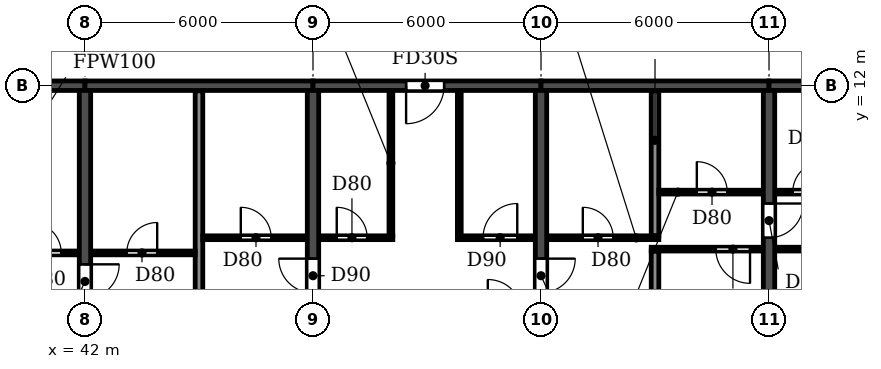
"""IFC4 building model, lengths in metres.
Left out: names, types, materials, properties, quantities, classifications, styles, units other than length and angle.
Written with IfcOpenShell. Run it as: python <this file> out.ifc"""

import sys

from ifc_helpers import new_model, si_unit, direction, frame, frame_2d, origin, place, context, subcontext, project, spatial, rectangle, extrude, element, fill, save


model = new_model("IFC4")
c1 = context("Model", 3, precision=1e-05, world=origin(), true_north=direction((0.0, 1.0)))
c2 = subcontext(c1, "Body", "Model", "MODEL_VIEW")
j1 = project(units=[si_unit("LENGTHUNIT", "METRE"), si_unit("PLANEANGLEUNIT", "RADIAN")], contexts=[c1])
p1 = place(None, origin())
s1 = spatial("IfcSite", under=j1, at=p1, CompositionType="ELEMENT")
p2 = place(p1, origin())
s2 = spatial("IfcBuilding", under=s1, at=p2, CompositionType="ELEMENT")
p3 = place(p2, frame((0.0, 0.0, 155.4)))
s3 = spatial("IfcBuildingStorey", under=s2, at=p3, CompositionType="ELEMENT", Elevation=155.4)
p4 = place(p3, frame((42.0, 0.2, 0.0), z_axis=(0.0, 0.0, 1.0), x_axis=(0.0, 1.0, 0.0)))
e1 = element("IfcWall", 1, at=p4, inside=s3, PredefinedType="SHEAR", context=c2, shape_type="SweptSolid", body=[
    extrude(rectangle(XDim=11.675, YDim=0.3, at=frame_2d((5.837, 0.0))), origin(), (0.0, 0.0, 1.0), 3.0),
])
p5 = place(p4, frame((6.2, 0.0, 0.0)))
e2 = element("IfcOpeningElement", 2, at=p5, cuts=e1, PredefinedType="OPENING", context=c2, shape_type="SweptSolid", body=[
    extrude(rectangle(XDim=0.9, YDim=2.1, at=frame_2d((0.45, 1.05))), frame((0.0, 0.16, 0.0), z_axis=(0.0, -1.0, 0.0), x_axis=(1.0, 0.0, 0.0)), (0.0, 0.0, 1.0), 0.32),
])
p6 = place(p3, frame((48.0, 0.2, 0.0), z_axis=(0.0, 0.0, 1.0), x_axis=(0.0, 1.0, 0.0)))
e3 = element("IfcWall", 3, at=p6, inside=s3, PredefinedType="SHEAR", context=c2, shape_type="SweptSolid", body=[
    extrude(rectangle(XDim=11.675, YDim=0.3, at=frame_2d((5.837, 0.0))), origin(), (0.0, 0.0, 1.0), 3.0),
])
p7 = place(p6, frame((6.35, 0.0, 0.0)))
e4 = element("IfcOpeningElement", 4, at=p7, cuts=e3, PredefinedType="OPENING", context=c2, shape_type="SweptSolid", body=[
    extrude(rectangle(XDim=0.9, YDim=2.1, at=frame_2d((0.45, 1.05))), frame((0.0, 0.16, 0.0), z_axis=(0.0, -1.0, 0.0), x_axis=(1.0, 0.0, 0.0)), (0.0, 0.0, 1.0), 0.32),
])
p8 = place(p3, frame((54.0, 0.2, 0.0), z_axis=(0.0, 0.0, 1.0), x_axis=(0.0, 1.0, 0.0)))
e5 = element("IfcWall", 5, at=p8, inside=s3, PredefinedType="SHEAR", context=c2, shape_type="SweptSolid", body=[
    extrude(rectangle(XDim=11.675, YDim=0.3, at=frame_2d((5.837, 0.0))), origin(), (0.0, 0.0, 1.0), 3.0),
])
p9 = place(p8, frame((6.35, 0.0, 0.0)))
e6 = element("IfcOpeningElement", 6, at=p9, cuts=e5, PredefinedType="OPENING", context=c2, shape_type="SweptSolid", body=[
    extrude(rectangle(XDim=0.9, YDim=2.1, at=frame_2d((0.45, 1.05))), frame((0.0, 0.16, 0.0), z_axis=(0.0, -1.0, 0.0), x_axis=(1.0, 0.0, 0.0)), (0.0, 0.0, 1.0), 0.32),
])
p10 = place(p3, frame((60.0, 0.2, 0.0), z_axis=(0.0, 0.0, 1.0), x_axis=(0.0, 1.0, 0.0)))
e7 = element("IfcWall", 7, at=p10, inside=s3, PredefinedType="SHEAR", context=c2, shape_type="SweptSolid", body=[
    extrude(rectangle(XDim=11.675, YDim=0.3, at=frame_2d((5.837, 0.0))), origin(), (0.0, 0.0, 1.0), 3.0),
])
p11 = place(p10, frame((7.8, 0.0, 0.0)))
e8 = element("IfcOpeningElement", 8, at=p11, cuts=e7, PredefinedType="OPENING", context=c2, shape_type="SweptSolid", body=[
    extrude(rectangle(XDim=0.9, YDim=2.1, at=frame_2d((0.45, 1.05))), frame((0.0, 0.16, 0.0), z_axis=(0.0, -1.0, 0.0), x_axis=(1.0, 0.0, 0.0)), (0.0, 0.0, 1.0), 0.32),
])
p12 = place(p3, frame((36.0, 12.0, 0.0), z_axis=(0.0, 0.0, 1.0), x_axis=(1.0, 0.0, 0.0)))
e9 = element("IfcWall", 9, at=p12, inside=s3, PredefinedType="SHEAR", context=c2, shape_type="SweptSolid", body=[
    extrude(rectangle(XDim=6.0, YDim=0.25, at=frame_2d((3.0, 0.0))), origin(), (0.0, 0.0, 1.0), 2.4),
])
p13 = place(p12, frame((2.55, 0.0, 0.0)))
e10 = element("IfcOpeningElement", 10, at=p13, cuts=e9, PredefinedType="OPENING", context=c2, shape_type="SweptSolid", body=[
    extrude(rectangle(XDim=1.0, YDim=2.1, at=frame_2d((0.5, 1.05))), frame((0.0, 0.135, 0.0), z_axis=(0.0, -1.0, 0.0), x_axis=(1.0, 0.0, 0.0)), (0.0, 0.0, 1.0), 0.27),
])
p14 = place(p3, frame((42.0, 12.0, 0.0), z_axis=(0.0, 0.0, 1.0), x_axis=(1.0, 0.0, 0.0)))
e11 = element("IfcWall", 11, at=p14, inside=s3, PredefinedType="SHEAR", context=c2, shape_type="SweptSolid", body=[
    extrude(rectangle(XDim=6.0, YDim=0.25, at=frame_2d((3.0, 0.0))), origin(), (0.0, 0.0, 1.0), 2.4),
])
p15 = place(p3, frame((48.0, 12.0, 0.0), z_axis=(0.0, 0.0, 1.0), x_axis=(1.0, 0.0, 0.0)))
e12 = element("IfcWall", 12, at=p15, inside=s3, PredefinedType="SHEAR", context=c2, shape_type="SweptSolid", body=[
    extrude(rectangle(XDim=6.0, YDim=0.25, at=frame_2d((3.0, 0.0))), origin(), (0.0, 0.0, 1.0), 2.4),
])
p16 = place(p15, frame((2.45, 0.0, 0.0)))
e13 = element("IfcOpeningElement", 13, at=p16, cuts=e12, PredefinedType="OPENING", context=c2, shape_type="SweptSolid", body=[
    extrude(rectangle(XDim=1.0, YDim=2.1, at=frame_2d((0.5, 1.05))), frame((0.0, 0.135, 0.0), z_axis=(0.0, -1.0, 0.0), x_axis=(1.0, 0.0, 0.0)), (0.0, 0.0, 1.0), 0.27),
])
p17 = place(p3, frame((54.0, 12.0, 0.0), z_axis=(0.0, 0.0, 1.0), x_axis=(1.0, 0.0, 0.0)))
e14 = element("IfcWall", 14, at=p17, inside=s3, PredefinedType="SHEAR", context=c2, shape_type="SweptSolid", body=[
    extrude(rectangle(XDim=6.0, YDim=0.25, at=frame_2d((3.0, 0.0))), origin(), (0.0, 0.0, 1.0), 2.4),
])
p18 = place(p3, frame((60.0, 12.0, 0.0), z_axis=(0.0, 0.0, 1.0), x_axis=(1.0, 0.0, 0.0)))
e15 = element("IfcWall", 15, at=p18, inside=s3, PredefinedType="SHEAR", context=c2, shape_type="SweptSolid", body=[
    extrude(rectangle(XDim=6.0, YDim=0.25, at=frame_2d((3.0, 0.0))), origin(), (0.0, 0.0, 1.0), 2.4),
])
p19 = place(p18, frame((2.45, 0.0, 0.0)))
e16 = element("IfcOpeningElement", 16, at=p19, cuts=e15, PredefinedType="OPENING", context=c2, shape_type="SweptSolid", body=[
    extrude(rectangle(XDim=1.0, YDim=2.1, at=frame_2d((0.5, 1.05))), frame((0.0, 0.135, 0.0), z_axis=(0.0, -1.0, 0.0), x_axis=(1.0, 0.0, 0.0)), (0.0, 0.0, 1.0), 0.27),
])
p20 = place(p3, frame((45.0, 0.06, 0.0), z_axis=(0.0, 0.0, 1.0), x_axis=(0.0, 1.0, 0.0)))
e17 = element("IfcWall", 17, at=p20, inside=s3, PredefinedType="PARTITIONING", context=c2, shape_type="SweptSolid", body=[
    extrude(rectangle(XDim=11.805, YDim=0.2, at=frame_2d((5.902, 0.0))), origin(), (0.0, 0.0, 1.0), 3.0),
])
p21 = place(p3, frame((57.0, 0.06, 0.0), z_axis=(0.0, 0.0, 1.0), x_axis=(0.0, 1.0, 0.0)))
e18 = element("IfcWall", 18, at=p21, inside=s3, PredefinedType="PARTITIONING", context=c2, shape_type="SweptSolid", body=[
    extrude(rectangle(XDim=7.59, YDim=0.2, at=frame_2d((3.795, 0.0))), origin(), (0.0, 0.0, 1.0), 3.0),
])
p22 = place(p3, frame((57.0, 8.05, 0.0), z_axis=(0.0, 0.0, 1.0), x_axis=(0.0, 1.0, 0.0)))
e19 = element("IfcWall", 19, at=p22, inside=s3, PredefinedType="PARTITIONING", context=c2, shape_type="SweptSolid", body=[
    extrude(rectangle(XDim=3.815, YDim=0.2, at=frame_2d((1.907, 0.0))), origin(), (0.0, 0.0, 1.0), 3.0),
])
p23 = place(p3, frame((39.9, 7.6, 0.0), z_axis=(0.0, 0.0, 1.0), x_axis=(1.0, 0.0, 0.0)))
e20 = element("IfcWall", 20, at=p23, inside=s3, PredefinedType="PARTITIONING", context=c2, shape_type="SweptSolid", body=[
    extrude(rectangle(XDim=1.94, YDim=0.1, at=frame_2d((0.97, 0.0))), origin(), (0.0, 0.0, 1.0), 3.0),
])
p24 = place(p23, frame((0.675, 0.0, 0.0)))
e21 = element("IfcOpeningElement", 21, at=p24, cuts=e20, PredefinedType="OPENING", context=c2, shape_type="SweptSolid", body=[
    extrude(rectangle(XDim=0.8, YDim=2.1, at=frame_2d((0.4, 1.05))), frame((0.0, 0.06, 0.0), z_axis=(0.0, -1.0, 0.0), x_axis=(1.0, 0.0, 0.0)), (0.0, 0.0, 1.0), 0.12),
])
p25 = place(p3, frame((42.16, 7.6, 0.0), z_axis=(0.0, 0.0, 1.0), x_axis=(1.0, 0.0, 0.0)))
e22 = element("IfcWall", 22, at=p25, inside=s3, PredefinedType="PARTITIONING", context=c2, shape_type="SweptSolid", body=[
    extrude(rectangle(XDim=2.74, YDim=0.1, at=frame_2d((1.37, 0.0))), origin(), (0.0, 0.0, 1.0), 3.0),
])
p26 = place(p25, frame((0.94, 0.0, 0.0)))
e23 = element("IfcOpeningElement", 23, at=p26, cuts=e22, PredefinedType="OPENING", context=c2, shape_type="SweptSolid", body=[
    extrude(rectangle(XDim=0.8, YDim=2.1, at=frame_2d((0.4, 1.05))), frame((0.0, 0.06, 0.0), z_axis=(0.0, -1.0, 0.0), x_axis=(1.0, 0.0, 0.0)), (0.0, 0.0, 1.0), 0.12),
])
p27 = place(p3, frame((56.9, 7.7, 0.0), z_axis=(0.0, 0.0, 1.0), x_axis=(1.0, 0.0, 0.0)))
e24 = element("IfcWall", 24, at=p27, inside=s3, PredefinedType="PARTITIONING", context=c2, shape_type="SweptSolid", body=[
    extrude(rectangle(XDim=2.94, YDim=0.1, at=frame_2d((1.47, 0.0))), origin(), (0.0, 0.0, 1.0), 3.0),
])
p28 = place(p27, frame((1.7, 0.0, 0.0)))
e25 = element("IfcOpeningElement", 25, at=p28, cuts=e24, PredefinedType="OPENING", context=c2, shape_type="SweptSolid", body=[
    extrude(rectangle(XDim=0.9, YDim=2.1, at=frame_2d((0.45, 1.05))), frame((0.0, 0.06, 0.0), z_axis=(0.0, -1.0, 0.0), x_axis=(1.0, 0.0, 0.0)), (0.0, 0.0, 1.0), 0.12),
])
p29 = place(p3, frame((60.16, 7.7, 0.0), z_axis=(0.0, 0.0, 1.0), x_axis=(1.0, 0.0, 0.0)))
e26 = element("IfcWall", 26, at=p29, inside=s3, PredefinedType="PARTITIONING", context=c2, shape_type="SweptSolid", body=[
    extrude(rectangle(XDim=2.89, YDim=0.1, at=frame_2d((1.445, 0.0))), origin(), (0.0, 0.0, 1.0), 3.0),
])
p30 = place(p29, frame((1.44, 0.0, 0.0)))
e27 = element("IfcOpeningElement", 27, at=p30, cuts=e26, PredefinedType="OPENING", context=c2, shape_type="SweptSolid", body=[
    extrude(rectangle(XDim=0.9, YDim=2.1, at=frame_2d((0.45, 1.05))), frame((0.0, 0.06, 0.0), z_axis=(0.0, -1.0, 0.0), x_axis=(1.0, 0.0, 0.0)), (0.0, 0.0, 1.0), 0.12),
])
p31 = place(p3, frame((45.1, 8.0, 0.0), z_axis=(0.0, 0.0, 1.0), x_axis=(1.0, 0.0, 0.0)))
e28 = element("IfcWall", 28, at=p31, inside=s3, PredefinedType="PARTITIONING", context=c2, shape_type="SweptSolid", body=[
    extrude(rectangle(XDim=2.74, YDim=0.1, at=frame_2d((1.37, 0.0))), origin(), (0.0, 0.0, 1.0), 3.0),
])
p32 = place(p31, frame((1.0, 0.0, 0.0)))
e29 = element("IfcOpeningElement", 29, at=p32, cuts=e28, PredefinedType="OPENING", context=c2, shape_type="SweptSolid", body=[
    extrude(rectangle(XDim=0.8, YDim=2.1, at=frame_2d((0.4, 1.05))), frame((0.0, 0.06, 0.0), z_axis=(0.0, -1.0, 0.0), x_axis=(1.0, 0.0, 0.0)), (0.0, 0.0, 1.0), 0.12),
])
p33 = place(p3, frame((48.16, 8.0, 0.0), z_axis=(0.0, 0.0, 1.0), x_axis=(1.0, 0.0, 0.0)))
e30 = element("IfcWall", 30, at=p33, inside=s3, PredefinedType="PARTITIONING", context=c2, shape_type="SweptSolid", body=[
    extrude(rectangle(XDim=1.94, YDim=0.1, at=frame_2d((0.97, 0.0))), origin(), (0.0, 0.0, 1.0), 3.0),
])
p34 = place(p33, frame((0.465, 0.0, 0.0)))
e31 = element("IfcOpeningElement", 31, at=p34, cuts=e30, PredefinedType="OPENING", context=c2, shape_type="SweptSolid", body=[
    extrude(rectangle(XDim=0.8, YDim=2.1, at=frame_2d((0.4, 1.05))), frame((0.0, 0.06, 0.0), z_axis=(0.0, -1.0, 0.0), x_axis=(1.0, 0.0, 0.0)), (0.0, 0.0, 1.0), 0.12),
])
p35 = place(p3, frame((51.8, 8.0, 0.0), z_axis=(0.0, 0.0, 1.0), x_axis=(1.0, 0.0, 0.0)))
e32 = element("IfcWall", 32, at=p35, inside=s3, PredefinedType="PARTITIONING", context=c2, shape_type="SweptSolid", body=[
    extrude(rectangle(XDim=2.04, YDim=0.1, at=frame_2d((1.02, 0.0))), origin(), (0.0, 0.0, 1.0), 3.0),
])
p36 = place(p35, frame((0.675, 0.0, 0.0)))
e33 = element("IfcOpeningElement", 33, at=p36, cuts=e32, PredefinedType="OPENING", context=c2, shape_type="SweptSolid", body=[
    extrude(rectangle(XDim=0.9, YDim=2.1, at=frame_2d((0.45, 1.05))), frame((0.0, 0.06, 0.0), z_axis=(0.0, -1.0, 0.0), x_axis=(1.0, 0.0, 0.0)), (0.0, 0.0, 1.0), 0.12),
])
p37 = place(p3, frame((54.16, 8.0, 0.0), z_axis=(0.0, 0.0, 1.0), x_axis=(1.0, 0.0, 0.0)))
e34 = element("IfcWall", 34, at=p37, inside=s3, PredefinedType="PARTITIONING", context=c2, shape_type="SweptSolid", body=[
    extrude(rectangle(XDim=2.94, YDim=0.1, at=frame_2d((1.47, 0.0))), origin(), (0.0, 0.0, 1.0), 3.0),
])
p38 = place(p37, frame((0.94, 0.0, 0.0)))
e35 = element("IfcOpeningElement", 35, at=p38, cuts=e34, PredefinedType="OPENING", context=c2, shape_type="SweptSolid", body=[
    extrude(rectangle(XDim=0.8, YDim=2.1, at=frame_2d((0.4, 1.05))), frame((0.0, 0.06, 0.0), z_axis=(0.0, -1.0, 0.0), x_axis=(1.0, 0.0, 0.0)), (0.0, 0.0, 1.0), 0.12),
])
p39 = place(p3, frame((57.1, 9.2, 0.0), z_axis=(0.0, 0.0, 1.0), x_axis=(1.0, 0.0, 0.0)))
e36 = element("IfcWall", 36, at=p39, inside=s3, PredefinedType="PARTITIONING", context=c2, shape_type="SweptSolid", body=[
    extrude(rectangle(XDim=2.74, YDim=0.1, at=frame_2d((1.37, 0.0))), origin(), (0.0, 0.0, 1.0), 3.0),
])
p40 = place(p39, frame((1.0, 0.0, 0.0)))
e37 = element("IfcOpeningElement", 37, at=p40, cuts=e36, PredefinedType="OPENING", context=c2, shape_type="SweptSolid", body=[
    extrude(rectangle(XDim=0.8, YDim=2.1, at=frame_2d((0.4, 1.05))), frame((0.0, 0.06, 0.0), z_axis=(0.0, -1.0, 0.0), x_axis=(1.0, 0.0, 0.0)), (0.0, 0.0, 1.0), 0.12),
])
p41 = place(p3, frame((60.16, 9.2, 0.0), z_axis=(0.0, 0.0, 1.0), x_axis=(1.0, 0.0, 0.0)))
e38 = element("IfcWall", 38, at=p41, inside=s3, PredefinedType="PARTITIONING", context=c2, shape_type="SweptSolid", body=[
    extrude(rectangle(XDim=1.94, YDim=0.1, at=frame_2d((0.97, 0.0))), origin(), (0.0, 0.0, 1.0), 3.0),
])
p42 = place(p41, frame((0.465, 0.0, 0.0)))
e39 = element("IfcOpeningElement", 39, at=p42, cuts=e38, PredefinedType="OPENING", context=c2, shape_type="SweptSolid", body=[
    extrude(rectangle(XDim=0.8, YDim=2.1, at=frame_2d((0.4, 1.05))), frame((0.0, 0.06, 0.0), z_axis=(0.0, -1.0, 0.0), x_axis=(1.0, 0.0, 0.0)), (0.0, 0.0, 1.0), 0.12),
])
for number, where, z_axis, x_axis in (
    (40, (50.05, 8.05, 0.0), (0.0, 0.0, 1.0), (0.0, 1.0, 0.0)),
    (41, (51.85, 8.05, 0.0), (0.0, 0.0, 1.0), (0.0, 1.0, 0.0)),
):
    element("IfcWall", number, at=place(p3, frame(where, z_axis=z_axis, x_axis=x_axis)), inside=s3, PredefinedType="PARTITIONING", context=c2, shape_type="SweptSolid", body=[
        extrude(rectangle(XDim=3.815, YDim=0.1, at=frame_2d((1.907, 0.0))), origin(), (0.0, 0.0, 1.0), 3.0),
    ])
p43 = place(p26, origin())
e42 = element("IfcDoor", 42, at=p43, inside=s3, OperationType="SINGLE_SWING_RIGHT", PredefinedType="DOOR", context=c2, shape_type="SweptSolid", body=[
    extrude(rectangle(XDim=0.8, YDim=2.1, at=frame_2d((0.4, 1.05))), frame((0.0, 0.025, 0.0), z_axis=(0.0, -1.0, 0.0), x_axis=(1.0, 0.0, 0.0)), (0.0, 0.0, 1.0), 0.05),
])
fill(e23, e42)
p44 = place(p24, origin())
e43 = element("IfcDoor", 43, at=p44, inside=s3, OperationType="SINGLE_SWING_LEFT", PredefinedType="DOOR", context=c2, shape_type="SweptSolid", body=[
    extrude(rectangle(XDim=0.8, YDim=2.1, at=frame_2d((0.4, 1.05))), frame((0.0, 0.025, 0.0), z_axis=(0.0, -1.0, 0.0), x_axis=(1.0, 0.0, 0.0)), (0.0, 0.0, 1.0), 0.05),
])
fill(e21, e43)
p45 = place(p5, frame((0.9, 0.0, 0.0), z_axis=(0.0, 0.0, 1.0), x_axis=(-1.0, 0.0, 0.0)))
e44 = element("IfcDoor", 44, at=p45, inside=s3, OperationType="SINGLE_SWING_LEFT", PredefinedType="DOOR", context=c2, shape_type="SweptSolid", body=[
    extrude(rectangle(XDim=0.9, YDim=2.1, at=frame_2d((0.45, 1.05))), frame((0.0, 0.025, 0.0), z_axis=(0.0, -1.0, 0.0), x_axis=(1.0, 0.0, 0.0)), (0.0, 0.0, 1.0), 0.05),
])
fill(e2, e44)
p46 = place(p32, origin())
e45 = element("IfcDoor", 45, at=p46, inside=s3, OperationType="SINGLE_SWING_LEFT", PredefinedType="DOOR", context=c2, shape_type="SweptSolid", body=[
    extrude(rectangle(XDim=0.8, YDim=2.1, at=frame_2d((0.4, 1.05))), frame((0.0, 0.025, 0.0), z_axis=(0.0, -1.0, 0.0), x_axis=(1.0, 0.0, 0.0)), (0.0, 0.0, 1.0), 0.05),
])
fill(e29, e45)
p47 = place(p38, origin())
e46 = element("IfcDoor", 46, at=p47, inside=s3, OperationType="SINGLE_SWING_LEFT", PredefinedType="DOOR", context=c2, shape_type="SweptSolid", body=[
    extrude(rectangle(XDim=0.8, YDim=2.1, at=frame_2d((0.4, 1.05))), frame((0.0, 0.025, 0.0), z_axis=(0.0, -1.0, 0.0), x_axis=(1.0, 0.0, 0.0)), (0.0, 0.0, 1.0), 0.05),
])
fill(e35, e46)
p48 = place(p7, origin())
e47 = element("IfcDoor", 47, at=p48, inside=s3, OperationType="SINGLE_SWING_RIGHT", PredefinedType="DOOR", context=c2, shape_type="SweptSolid", body=[
    extrude(rectangle(XDim=0.9, YDim=2.1, at=frame_2d((0.45, 1.05))), frame((0.0, 0.025, 0.0), z_axis=(0.0, -1.0, 0.0), x_axis=(1.0, 0.0, 0.0)), (0.0, 0.0, 1.0), 0.05),
])
fill(e4, e47)
p49 = place(p34, origin())
e48 = element("IfcDoor", 48, at=p49, inside=s3, OperationType="SINGLE_SWING_LEFT", PredefinedType="DOOR", context=c2, shape_type="SweptSolid", body=[
    extrude(rectangle(XDim=0.8, YDim=2.1, at=frame_2d((0.4, 1.05))), frame((0.0, 0.025, 0.0), z_axis=(0.0, -1.0, 0.0), x_axis=(1.0, 0.0, 0.0)), (0.0, 0.0, 1.0), 0.05),
])
fill(e31, e48)
p50 = place(p16, frame((1.0, 0.0, 0.0), z_axis=(0.0, 0.0, 1.0), x_axis=(-1.0, 0.0, 0.0)))
e49 = element("IfcDoor", 49, at=p50, inside=s3, OperationType="SINGLE_SWING_RIGHT", PredefinedType="DOOR", context=c2, shape_type="SweptSolid", body=[
    extrude(rectangle(XDim=1.0, YDim=2.1, at=frame_2d((0.5, 1.05))), frame((0.0, 0.025, 0.0), z_axis=(0.0, -1.0, 0.0), x_axis=(1.0, 0.0, 0.0)), (0.0, 0.0, 1.0), 0.05),
])
fill(e13, e49)
p51 = place(p36, origin())
e50 = element("IfcDoor", 50, at=p51, inside=s3, OperationType="SINGLE_SWING_RIGHT", PredefinedType="DOOR", context=c2, shape_type="SweptSolid", body=[
    extrude(rectangle(XDim=0.9, YDim=2.1, at=frame_2d((0.45, 1.05))), frame((0.0, 0.025, 0.0), z_axis=(0.0, -1.0, 0.0), x_axis=(1.0, 0.0, 0.0)), (0.0, 0.0, 1.0), 0.05),
])
fill(e33, e50)
p52 = place(p9, frame((0.9, 0.0, 0.0), z_axis=(0.0, 0.0, 1.0), x_axis=(-1.0, 0.0, 0.0)))
e51 = element("IfcDoor", 51, at=p52, inside=s3, OperationType="SINGLE_SWING_LEFT", PredefinedType="DOOR", context=c2, shape_type="SweptSolid", body=[
    extrude(rectangle(XDim=0.9, YDim=2.1, at=frame_2d((0.45, 1.05))), frame((0.0, 0.025, 0.0), z_axis=(0.0, -1.0, 0.0), x_axis=(1.0, 0.0, 0.0)), (0.0, 0.0, 1.0), 0.05),
])
fill(e6, e51)
p53 = place(p40, origin())
e52 = element("IfcDoor", 52, at=p53, inside=s3, OperationType="SINGLE_SWING_LEFT", PredefinedType="DOOR", context=c2, shape_type="SweptSolid", body=[
    extrude(rectangle(XDim=0.8, YDim=2.1, at=frame_2d((0.4, 1.05))), frame((0.0, 0.025, 0.0), z_axis=(0.0, -1.0, 0.0), x_axis=(1.0, 0.0, 0.0)), (0.0, 0.0, 1.0), 0.05),
])
fill(e37, e52)
p54 = place(p28, frame((0.9, 0.0, 0.0), z_axis=(0.0, 0.0, 1.0), x_axis=(-1.0, 0.0, 0.0)))
e53 = element("IfcDoor", 53, at=p54, inside=s3, OperationType="SINGLE_SWING_LEFT", PredefinedType="DOOR", context=c2, shape_type="SweptSolid", body=[
    extrude(rectangle(XDim=0.9, YDim=2.1, at=frame_2d((0.45, 1.05))), frame((0.0, 0.025, 0.0), z_axis=(0.0, -1.0, 0.0), x_axis=(1.0, 0.0, 0.0)), (0.0, 0.0, 1.0), 0.05),
])
fill(e25, e53)
p55 = place(p11, frame((0.9, 0.0, 0.0), z_axis=(0.0, 0.0, 1.0), x_axis=(-1.0, 0.0, 0.0)))
e54 = element("IfcDoor", 54, at=p55, inside=s3, OperationType="SINGLE_SWING_LEFT", PredefinedType="DOOR", context=c2, shape_type="SweptSolid", body=[
    extrude(rectangle(XDim=0.9, YDim=2.1, at=frame_2d((0.45, 1.05))), frame((0.0, 0.025, 0.0), z_axis=(0.0, -1.0, 0.0), x_axis=(1.0, 0.0, 0.0)), (0.0, 0.0, 1.0), 0.05),
])
fill(e8, e54)
p56 = place(p42, origin())
e55 = element("IfcDoor", 55, at=p56, inside=s3, OperationType="SINGLE_SWING_RIGHT", PredefinedType="DOOR", context=c2, shape_type="SweptSolid", body=[
    extrude(rectangle(XDim=0.8, YDim=2.1, at=frame_2d((0.4, 1.05))), frame((0.0, 0.025, 0.0), z_axis=(0.0, -1.0, 0.0), x_axis=(1.0, 0.0, 0.0)), (0.0, 0.0, 1.0), 0.05),
])
fill(e39, e55)
save(model, sys.argv[1])
